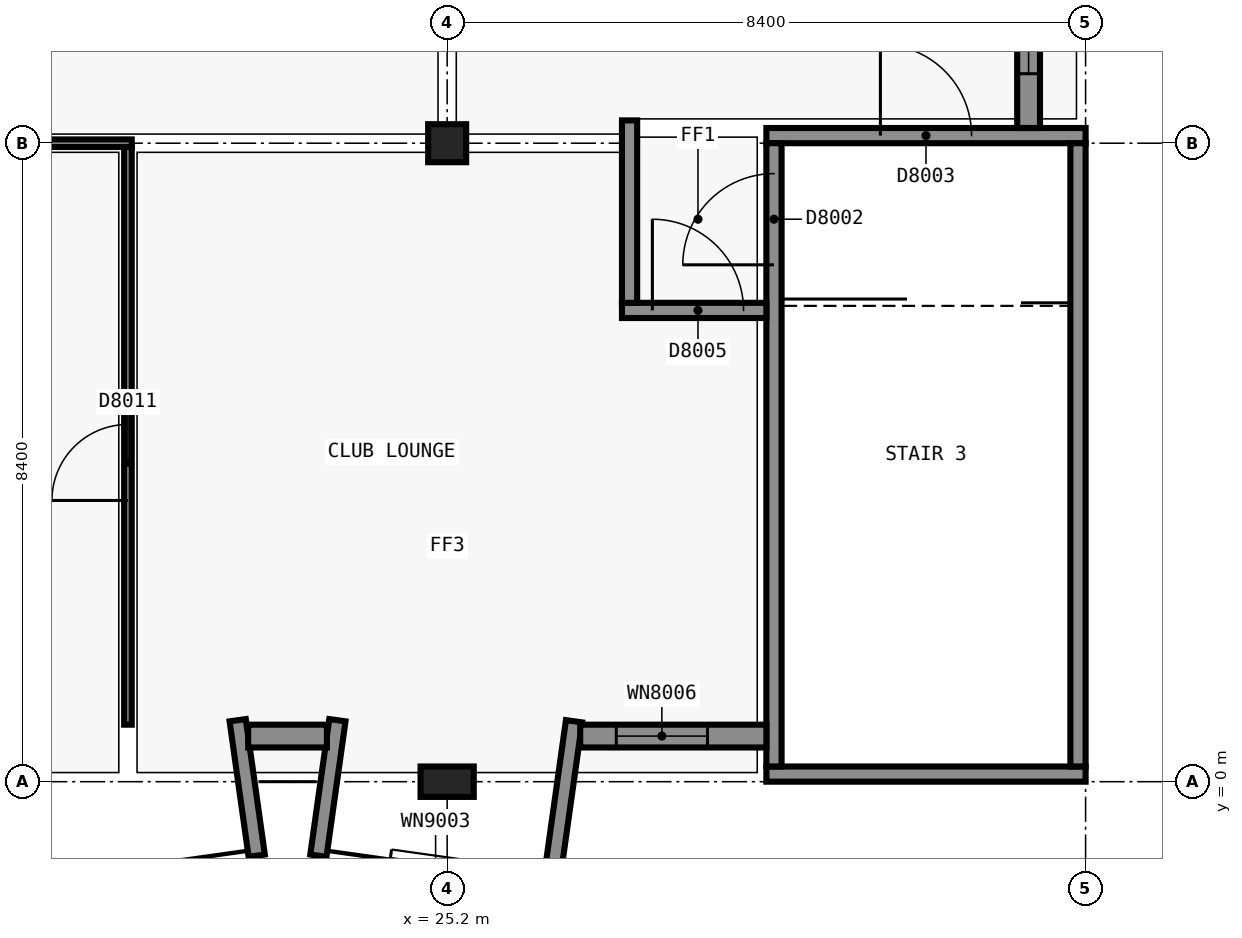
"""IFC4 building model, lengths in metres.
Left out: names, types, materials, properties, quantities, classifications, styles, units other than length and angle.
Written with IfcOpenShell. Run it as: python <this file> out.ifc"""

import sys

from ifc_helpers import new_model, si_unit, direction, frame, frame_2d, origin, origin_2d, place, context, subcontext, project, spatial, rectangle, extrude, element, fill, save


model = new_model("IFC4")
c1 = context("Model", 3, precision=1e-05, world=origin(), true_north=direction((0.0, 1.0)))
c2 = subcontext(c1, "Body", "Model", "MODEL_VIEW")
j1 = project(units=[si_unit("LENGTHUNIT", "METRE"), si_unit("PLANEANGLEUNIT", "RADIAN")], contexts=[c1])
p1 = place(None, origin())
s1 = spatial("IfcSite", under=j1, at=p1, CompositionType="ELEMENT")
p2 = place(p1, origin())
s2 = spatial("IfcBuilding", under=s1, at=p2, CompositionType="ELEMENT")
p3 = place(p2, frame((0.0, 0.0, 38.1)))
s3 = spatial("IfcBuildingStorey", under=s2, at=p3, CompositionType="ELEMENT", Elevation=38.1)
p4 = place(p3, frame((33.6, 0.1, 0.0), z_axis=(0.0, 0.0, 1.0), x_axis=(-1.0, 0.0, 0.0)))
e1 = element("IfcWall", 1, at=p4, inside=s3, PredefinedType="SHEAR", context=c2, shape_type="SweptSolid", body=[
    extrude(rectangle(XDim=4.2, YDim=0.2, at=frame_2d((2.1, 0.0))), origin(), (0.0, 0.0, 1.0), 4.5),
])
p5 = place(p3, frame((29.4, 8.5, 0.0), z_axis=(0.0, 0.0, 1.0), x_axis=(1.0, 0.0, 0.0)))
e2 = element("IfcWall", 2, at=p5, inside=s3, PredefinedType="SHEAR", context=c2, shape_type="SweptSolid", body=[
    extrude(rectangle(XDim=4.2, YDim=0.2, at=frame_2d((2.1, 0.0))), origin(), (0.0, 0.0, 1.0), 4.5),
])
p6 = place(p5, frame((1.5, 0.0, 0.0)))
e3 = element("IfcOpeningElement", 3, at=p6, cuts=e2, PredefinedType="OPENING", context=c2, shape_type="SweptSolid", body=[
    extrude(rectangle(XDim=1.2, YDim=2.1, at=frame_2d((0.6, 1.05))), frame((0.0, 0.11, 0.0), z_axis=(0.0, -1.0, 0.0), x_axis=(1.0, 0.0, 0.0)), (0.0, 0.0, 1.0), 0.22),
])
p7 = place(p3, frame((29.5, 0.2, 0.0), z_axis=(0.0, 0.0, 1.0), x_axis=(0.0, 1.0, 0.0)))
e4 = element("IfcWall", 4, at=p7, inside=s3, PredefinedType="SHEAR", context=c2, shape_type="SweptSolid", body=[
    extrude(rectangle(XDim=8.2, YDim=0.2, at=frame_2d((4.1, 0.0))), origin(), (0.0, 0.0, 1.0), 4.5),
])
p8 = place(p7, frame((6.6, 0.0, 0.0)))
e5 = element("IfcOpeningElement", 5, at=p8, cuts=e4, PredefinedType="OPENING", context=c2, shape_type="SweptSolid", body=[
    extrude(rectangle(XDim=1.2, YDim=2.1, at=frame_2d((0.6, 1.05))), frame((0.0, 0.11, 0.0), z_axis=(0.0, -1.0, 0.0), x_axis=(1.0, 0.0, 0.0)), (0.0, 0.0, 1.0), 0.22),
])
p9 = place(p3, frame((33.5, 8.4, 0.0), z_axis=(0.0, 0.0, 1.0), x_axis=(0.0, -1.0, 0.0)))
e6 = element("IfcWall", 6, at=p9, inside=s3, PredefinedType="SHEAR", context=c2, shape_type="SweptSolid", body=[
    extrude(rectangle(XDim=8.2, YDim=0.2, at=frame_2d((4.1, 0.0))), origin(), (0.0, 0.0, 1.0), 4.5),
])
p10 = place(p3, frame((25.2, 0.0, 0.0), z_axis=(0.0, 0.0, 1.0), x_axis=(1.0, 0.0, 0.0)))
e7 = element("IfcColumn", 7, at=p10, inside=s3, PredefinedType="COLUMN", context=c2, shape_type="SweptSolid", body=[
    extrude(rectangle(XDim=0.7, YDim=0.4, at=origin_2d()), origin(), (0.0, 0.0, 1.0), 4.5),
])
p11 = place(p3, frame((25.2, 8.4, 0.0), z_axis=(0.0, 0.0, 1.0), x_axis=(1.0, 0.0, 0.0)))
e8 = element("IfcColumn", 8, at=p11, inside=s3, PredefinedType="COLUMN", context=c2, shape_type="SweptSolid", body=[
    extrude(rectangle(XDim=0.5, YDim=0.5, at=origin_2d()), origin(), (0.0, 0.0, 1.0), 4.5),
])
p12 = place(p3, frame((32.85, 10.828, 0.0), z_axis=(0.0, 0.0, 1.0), x_axis=(0.0, -1.0, 0.0)))
e9 = element("IfcWall", 9, at=p12, inside=s3, PredefinedType="SOLIDWALL", context=c2, shape_type="SweptSolid", body=[
    extrude(rectangle(XDim=2.228, YDim=0.3, at=frame_2d((1.114, 0.0))), origin(), (0.0, 0.0, 1.0), 4.2),
])
p13 = place(p12, frame((0.314, 0.0, 0.9)))
e10 = element("IfcOpeningElement", 10, at=p13, cuts=e9, PredefinedType="OPENING", context=c2, shape_type="SweptSolid", body=[
    extrude(rectangle(XDim=1.2, YDim=1.5, at=frame_2d((0.6, 0.75))), frame((0.0, 0.16, 0.0), z_axis=(0.0, -1.0, 0.0), x_axis=(1.0, 0.0, 0.0)), (0.0, 0.0, 1.0), 0.32),
])
for number, where, z_axis, x_axis in (
    (11, (22.444, 0.809, 0.0), (0.0, 0.0, 1.0), (0.139, -0.99, 0.0)),
    (12, (23.756, 0.809, 0.0), (0.0, 0.0, 1.0), (-0.139, -0.99, 0.0)),
):
    element("IfcWall", number, at=place(p3, frame(where, z_axis=z_axis, x_axis=x_axis)), inside=s3, PredefinedType="SOLIDWALL", context=c2, shape_type="SweptSolid", body=[
        extrude(rectangle(XDim=1.8, YDim=0.215, at=frame_2d((0.9, 0.0))), origin(), (0.0, 0.0, 1.0), 4.2),
    ])
p14 = place(p3, frame((26.869, 0.795, 0.0), z_axis=(0.0, 0.0, 1.0), x_axis=(-0.139141913905, -0.990272451295, 0.0)))
e13 = element("IfcWall", 13, at=p14, inside=s3, PredefinedType="SOLIDWALL", context=c2, shape_type="SweptSolid", body=[
    extrude(rectangle(XDim=2.219, YDim=0.215, at=frame_2d((1.11, 0.0))), origin(), (0.0, 0.0, 1.0), 4.2),
])
p15 = place(p3, frame((23.618, 0.6, 0.0), z_axis=(0.0, 0.0, 1.0), x_axis=(-1.0, 0.0, 0.0)))
e14 = element("IfcWall", 14, at=p15, inside=s3, PredefinedType="SOLIDWALL", context=c2, shape_type="SweptSolid", body=[
    extrude(rectangle(XDim=1.036, YDim=0.3, at=frame_2d((0.518, 0.0))), origin(), (0.0, 0.0, 1.0), 4.2),
])
p16 = place(p3, frame((29.4, 0.6, 0.0), z_axis=(0.0, 0.0, 1.0), x_axis=(-1.0, 0.0, 0.0)))
e15 = element("IfcWall", 15, at=p16, inside=s3, PredefinedType="SOLIDWALL", context=c2, shape_type="SweptSolid", body=[
    extrude(rectangle(XDim=2.449, YDim=0.3, at=frame_2d((1.225, 0.0))), origin(), (0.0, 0.0, 1.0), 4.2),
])
p17 = place(p16, frame((0.775, 0.0, 0.9)))
e16 = element("IfcOpeningElement", 16, at=p17, cuts=e15, PredefinedType="OPENING", context=c2, shape_type="SweptSolid", body=[
    extrude(rectangle(XDim=1.2, YDim=1.5, at=frame_2d((0.6, 0.75))), frame((0.0, 0.16, 0.0), z_axis=(0.0, -1.0, 0.0), x_axis=(1.0, 0.0, 0.0)), (0.0, 0.0, 1.0), 0.32),
])
p18 = place(p3, frame((27.5, 6.2, 0.0), z_axis=(0.0, 0.0, 1.0), x_axis=(1.0, 0.0, 0.0)))
e17 = element("IfcWall", 17, at=p18, inside=s3, PredefinedType="SOLIDWALL", context=c2, shape_type="SweptSolid", body=[
    extrude(rectangle(XDim=1.9, YDim=0.2, at=frame_2d((0.95, 0.0))), origin(), (0.0, 0.0, 1.0), 4.2),
])
p19 = place(p18, frame((0.4, 0.0, 0.0)))
e18 = element("IfcOpeningElement", 18, at=p19, cuts=e17, PredefinedType="OPENING", context=c2, shape_type="SweptSolid", body=[
    extrude(rectangle(XDim=1.2, YDim=2.1, at=frame_2d((0.6, 1.05))), frame((0.0, 0.11, 0.0), z_axis=(0.0, -1.0, 0.0), x_axis=(1.0, 0.0, 0.0)), (0.0, 0.0, 1.0), 0.22),
])
p20 = place(p3, frame((27.6, 6.3, 0.0), z_axis=(0.0, 0.0, 1.0), x_axis=(0.0, 1.0, 0.0)))
e19 = element("IfcWall", 19, at=p20, inside=s3, PredefinedType="SOLIDWALL", context=c2, shape_type="SweptSolid", body=[
    extrude(rectangle(XDim=2.4, YDim=0.2, at=frame_2d((1.2, 0.0))), origin(), (0.0, 0.0, 1.0), 3.6),
])
p21 = place(p3, frame((12.675, 8.4, 0.0), z_axis=(0.0, 0.0, 1.0), x_axis=(1.0, 0.0, 0.0)))
e20 = element("IfcWall", 20, at=p21, inside=s3, PredefinedType="PARTITIONING", context=c2, shape_type="SweptSolid", body=[
    extrude(rectangle(XDim=8.375, YDim=0.1, at=frame_2d((4.188, 0.0))), origin(), (0.0, 0.0, 1.0), 3.4),
])
p22 = place(p3, frame((21.0, 0.75, 0.0), z_axis=(0.0, 0.0, 1.0), x_axis=(0.0, 1.0, 0.0)))
e21 = element("IfcWall", 21, at=p22, inside=s3, PredefinedType="PARTITIONING", context=c2, shape_type="SweptSolid", body=[
    extrude(rectangle(XDim=7.6, YDim=0.1, at=frame_2d((3.8, 0.0))), origin(), (0.0, 0.0, 1.0), 3.4),
])
p23 = place(p22, frame((2.95, 0.0, 0.0)))
e22 = element("IfcOpeningElement", 22, at=p23, cuts=e21, PredefinedType="OPENING", context=c2, shape_type="SweptSolid", body=[
    extrude(rectangle(XDim=1.0, YDim=2.1, at=frame_2d((0.5, 1.05))), frame((0.0, 0.06, 0.0), z_axis=(0.0, -1.0, 0.0), x_axis=(1.0, 0.0, 0.0)), (0.0, 0.0, 1.0), 0.12),
])
p24 = place(p13, origin())
e23 = element("IfcWindow", 23, at=p24, inside=s3, PartitioningType="SINGLE_PANEL", PredefinedType="WINDOW", context=c2, shape_type="SweptSolid", body=[
    extrude(rectangle(XDim=1.2, YDim=1.5, at=frame_2d((0.6, 0.75))), frame((0.0, 0.03, 0.0), z_axis=(0.0, -1.0, 0.0), x_axis=(1.0, 0.0, 0.0)), (0.0, 0.0, 1.0), 0.06),
])
fill(e10, e23)
p25 = place(p17, origin())
e24 = element("IfcWindow", 24, at=p25, inside=s3, PartitioningType="SINGLE_PANEL", PredefinedType="WINDOW", context=c2, shape_type="SweptSolid", body=[
    extrude(rectangle(XDim=1.2, YDim=1.5, at=frame_2d((0.6, 0.75))), frame((0.0, 0.03, 0.0), z_axis=(0.0, -1.0, 0.0), x_axis=(1.0, 0.0, 0.0)), (0.0, 0.0, 1.0), 0.06),
])
fill(e16, e24)
p26 = place(p2, frame((0.0, 0.0, 42.6)))
p27 = place(p26, frame((23.627, -0.882, 0.0), z_axis=(0.0, 0.0, 1.0), x_axis=(0.990268489117, -0.139170109801, 0.0)))
p28 = place(p27, frame((0.835, 0.0, 0.6)))
p29 = place(p28, origin())
e25 = element("IfcWindow", 25, at=p29, inside=s3, PartitioningType="SINGLE_PANEL", PredefinedType="WINDOW", context=c2, shape_type="SweptSolid", body=[
    extrude(rectangle(XDim=1.2, YDim=1.8, at=frame_2d((0.6, 0.9))), frame((0.0, 0.03, 0.0), z_axis=(0.0, -1.0, 0.0), x_axis=(1.0, 0.0, 0.0)), (0.0, 0.0, 1.0), 0.06),
])
p30 = place(p8, origin())
e26 = element("IfcDoor", 26, at=p30, inside=s3, OperationType="SINGLE_SWING_RIGHT", PredefinedType="DOOR", context=c2, shape_type="SweptSolid", body=[
    extrude(rectangle(XDim=1.2, YDim=2.1, at=frame_2d((0.6, 1.05))), frame((0.0, 0.025, 0.0), z_axis=(0.0, -1.0, 0.0), x_axis=(1.0, 0.0, 0.0)), (0.0, 0.0, 1.0), 0.05),
])
fill(e5, e26)
p31 = place(p6, origin())
e27 = element("IfcDoor", 27, at=p31, inside=s3, OperationType="SINGLE_SWING_RIGHT", PredefinedType="DOOR", context=c2, shape_type="SweptSolid", body=[
    extrude(rectangle(XDim=1.2, YDim=2.1, at=frame_2d((0.6, 1.05))), frame((0.0, 0.025, 0.0), z_axis=(0.0, -1.0, 0.0), x_axis=(1.0, 0.0, 0.0)), (0.0, 0.0, 1.0), 0.05),
])
fill(e3, e27)
p32 = place(p19, origin())
e28 = element("IfcDoor", 28, at=p32, inside=s3, OperationType="SINGLE_SWING_RIGHT", PredefinedType="DOOR", context=c2, shape_type="SweptSolid", body=[
    extrude(rectangle(XDim=1.2, YDim=2.1, at=frame_2d((0.6, 1.05))), frame((0.0, 0.025, 0.0), z_axis=(0.0, -1.0, 0.0), x_axis=(1.0, 0.0, 0.0)), (0.0, 0.0, 1.0), 0.05),
])
fill(e18, e28)
p33 = place(p23, origin())
e29 = element("IfcDoor", 29, at=p33, inside=s3, OperationType="SINGLE_SWING_RIGHT", PredefinedType="DOOR", context=c2, shape_type="SweptSolid", body=[
    extrude(rectangle(XDim=1.0, YDim=2.1, at=frame_2d((0.5, 1.05))), frame((0.0, 0.025, 0.0), z_axis=(0.0, -1.0, 0.0), x_axis=(1.0, 0.0, 0.0)), (0.0, 0.0, 1.0), 0.05),
])
fill(e22, e29)
save(model, sys.argv[1])
